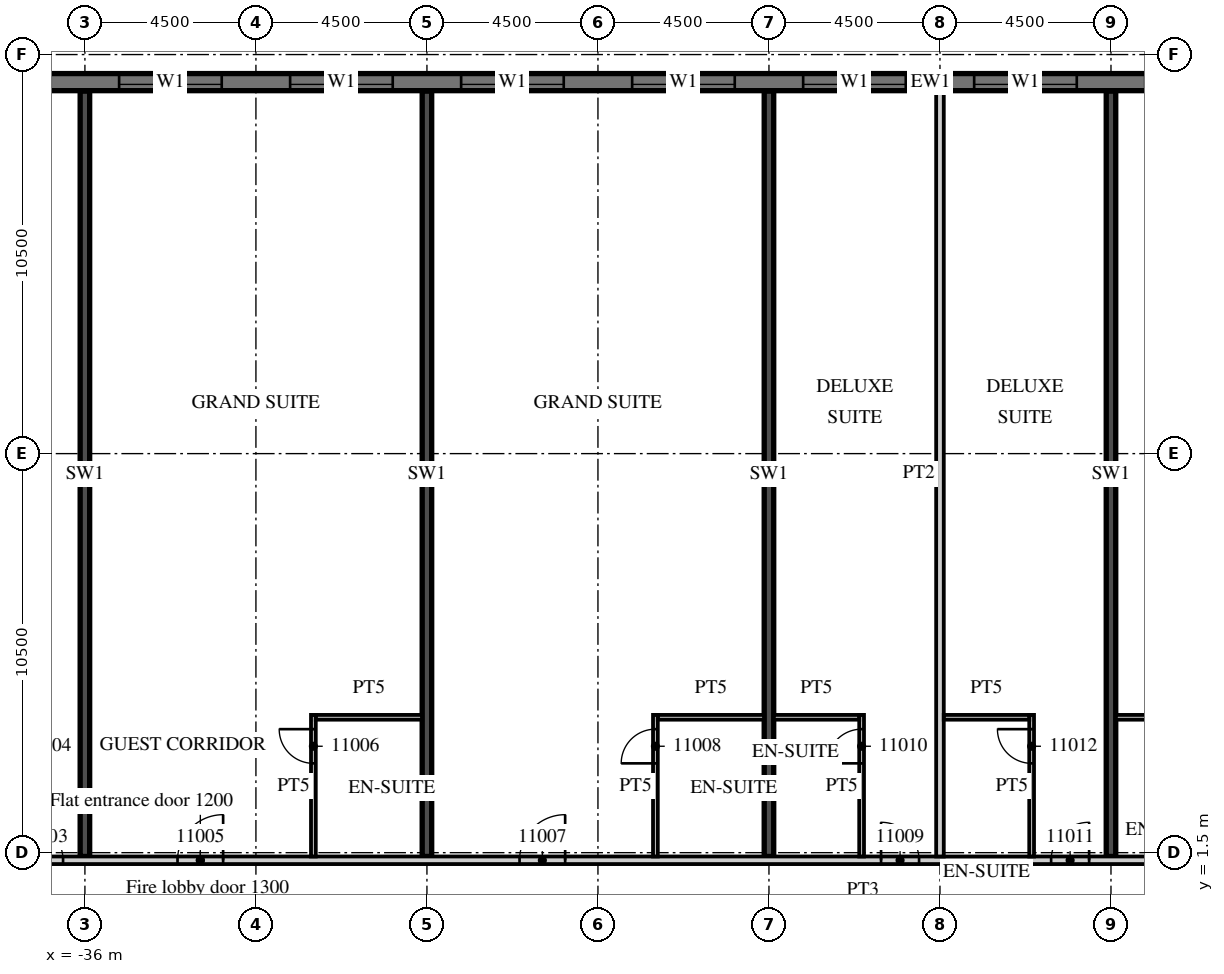
"""IFC4 building model, lengths in metres.
Left out: names, types, materials, properties, quantities, classifications, styles, units other than length and angle.
Written with IfcOpenShell. Run it as: python <this file> out.ifc"""

import sys

from ifc_helpers import new_model, si_unit, direction, frame, frame_2d, origin, place, context, subcontext, project, spatial, rectangle, extrude, element, fill, save


model = new_model("IFC4")
c1 = context("Model", 3, precision=1e-05, world=origin(), true_north=direction((0.0, 1.0)))
c2 = subcontext(c1, "Body", "Model", "MODEL_VIEW")
j1 = project(units=[si_unit("LENGTHUNIT", "METRE"), si_unit("PLANEANGLEUNIT", "RADIAN")], contexts=[c1])
p1 = place(None, origin())
s1 = spatial("IfcSite", under=j1, at=p1, CompositionType="ELEMENT")
p2 = place(p1, origin())
s2 = spatial("IfcBuilding", under=s1, at=p2, CompositionType="ELEMENT")
p3 = place(p2, frame((0.0, 0.0, 66.6)))
s3 = spatial("IfcBuildingStorey", under=s2, at=p3, CompositionType="ELEMENT", Elevation=66.6)
for number, where, z_axis, x_axis in (
    (1, (-36.0, 1.4, 0.0), (0.0, 0.0, 1.0), (0.0, 1.0, 0.0)),
    (2, (-27.0, 1.4, 0.0), (0.0, 0.0, 1.0), (0.0, 1.0, 0.0)),
    (3, (-18.0, 1.4, 0.0), (0.0, 0.0, 1.0), (0.0, 1.0, 0.0)),
    (4, (-9.0, 1.4, 0.0), (0.0, 0.0, 1.0), (0.0, 1.0, 0.0)),
):
    element("IfcWall", number, at=place(p3, frame(where, z_axis=z_axis, x_axis=x_axis)), inside=s3, PredefinedType="SHEAR", context=c2, shape_type="SweptSolid", body=[
        extrude(rectangle(XDim=20.14, YDim=0.25, at=frame_2d((10.07, 0.0))), origin(), (0.0, 0.0, 1.0), 3.3),
    ])
p4 = place(p3, frame((13.5, 21.775, 0.0), z_axis=(0.0, 0.0, 1.0), x_axis=(-1.0, 0.0, 0.0)))
e5 = element("IfcWall", 5, at=p4, inside=s3, PredefinedType="SOLIDWALL", context=c2, shape_type="SweptSolid", body=[
    extrude(rectangle(XDim=54.5, YDim=0.45, at=frame_2d((27.25, 0.0))), origin(), (0.0, 0.0, 1.0), 3.02),
])
p5 = place(p4, frame((0.9, 0.0, 0.45)))
e6 = element("IfcOpeningElement", 6, at=p5, cuts=e5, PredefinedType="OPENING", context=c2, shape_type="SweptSolid", body=[
    extrude(rectangle(XDim=2.7, YDim=2.25, at=frame_2d((1.35, 1.125))), frame((0.0, 0.235, 0.0), z_axis=(0.0, -1.0, 0.0), x_axis=(1.0, 0.0, 0.0)), (0.0, 0.0, 1.0), 0.47),
])
p6 = place(p4, frame((5.4, 0.0, 0.45)))
e7 = element("IfcOpeningElement", 7, at=p6, cuts=e5, PredefinedType="OPENING", context=c2, shape_type="SweptSolid", body=[
    extrude(rectangle(XDim=2.7, YDim=2.25, at=frame_2d((1.35, 1.125))), frame((0.0, 0.235, 0.0), z_axis=(0.0, -1.0, 0.0), x_axis=(1.0, 0.0, 0.0)), (0.0, 0.0, 1.0), 0.47),
])
p7 = place(p4, frame((9.9, 0.0, 0.45)))
e8 = element("IfcOpeningElement", 8, at=p7, cuts=e5, PredefinedType="OPENING", context=c2, shape_type="SweptSolid", body=[
    extrude(rectangle(XDim=2.7, YDim=2.25, at=frame_2d((1.35, 1.125))), frame((0.0, 0.235, 0.0), z_axis=(0.0, -1.0, 0.0), x_axis=(1.0, 0.0, 0.0)), (0.0, 0.0, 1.0), 0.47),
])
p8 = place(p4, frame((14.4, 0.0, 0.45)))
e9 = element("IfcOpeningElement", 9, at=p8, cuts=e5, PredefinedType="OPENING", context=c2, shape_type="SweptSolid", body=[
    extrude(rectangle(XDim=2.7, YDim=2.25, at=frame_2d((1.35, 1.125))), frame((0.0, 0.235, 0.0), z_axis=(0.0, -1.0, 0.0), x_axis=(1.0, 0.0, 0.0)), (0.0, 0.0, 1.0), 0.47),
])
p9 = place(p4, frame((18.9, 0.0, 0.45)))
e10 = element("IfcOpeningElement", 10, at=p9, cuts=e5, PredefinedType="OPENING", context=c2, shape_type="SweptSolid", body=[
    extrude(rectangle(XDim=2.7, YDim=2.25, at=frame_2d((1.35, 1.125))), frame((0.0, 0.235, 0.0), z_axis=(0.0, -1.0, 0.0), x_axis=(1.0, 0.0, 0.0)), (0.0, 0.0, 1.0), 0.47),
])
p10 = place(p4, frame((23.4, 0.0, 0.45)))
e11 = element("IfcOpeningElement", 11, at=p10, cuts=e5, PredefinedType="OPENING", context=c2, shape_type="SweptSolid", body=[
    extrude(rectangle(XDim=2.7, YDim=2.25, at=frame_2d((1.35, 1.125))), frame((0.0, 0.235, 0.0), z_axis=(0.0, -1.0, 0.0), x_axis=(1.0, 0.0, 0.0)), (0.0, 0.0, 1.0), 0.47),
])
p11 = place(p4, frame((27.9, 0.0, 0.45)))
e12 = element("IfcOpeningElement", 12, at=p11, cuts=e5, PredefinedType="OPENING", context=c2, shape_type="SweptSolid", body=[
    extrude(rectangle(XDim=2.7, YDim=2.25, at=frame_2d((1.35, 1.125))), frame((0.0, 0.235, 0.0), z_axis=(0.0, -1.0, 0.0), x_axis=(1.0, 0.0, 0.0)), (0.0, 0.0, 1.0), 0.47),
])
p12 = place(p4, frame((32.4, 0.0, 0.45)))
e13 = element("IfcOpeningElement", 13, at=p12, cuts=e5, PredefinedType="OPENING", context=c2, shape_type="SweptSolid", body=[
    extrude(rectangle(XDim=2.7, YDim=2.25, at=frame_2d((1.35, 1.125))), frame((0.0, 0.235, 0.0), z_axis=(0.0, -1.0, 0.0), x_axis=(1.0, 0.0, 0.0)), (0.0, 0.0, 1.0), 0.47),
])
p13 = place(p4, frame((36.9, 0.0, 0.45)))
e14 = element("IfcOpeningElement", 14, at=p13, cuts=e5, PredefinedType="OPENING", context=c2, shape_type="SweptSolid", body=[
    extrude(rectangle(XDim=2.7, YDim=2.25, at=frame_2d((1.35, 1.125))), frame((0.0, 0.235, 0.0), z_axis=(0.0, -1.0, 0.0), x_axis=(1.0, 0.0, 0.0)), (0.0, 0.0, 1.0), 0.47),
])
p14 = place(p4, frame((41.4, 0.0, 0.45)))
e15 = element("IfcOpeningElement", 15, at=p14, cuts=e5, PredefinedType="OPENING", context=c2, shape_type="SweptSolid", body=[
    extrude(rectangle(XDim=2.7, YDim=2.25, at=frame_2d((1.35, 1.125))), frame((0.0, 0.235, 0.0), z_axis=(0.0, -1.0, 0.0), x_axis=(1.0, 0.0, 0.0)), (0.0, 0.0, 1.0), 0.47),
])
p15 = place(p4, frame((45.9, 0.0, 0.45)))
e16 = element("IfcOpeningElement", 16, at=p15, cuts=e5, PredefinedType="OPENING", context=c2, shape_type="SweptSolid", body=[
    extrude(rectangle(XDim=2.7, YDim=2.25, at=frame_2d((1.35, 1.125))), frame((0.0, 0.235, 0.0), z_axis=(0.0, -1.0, 0.0), x_axis=(1.0, 0.0, 0.0)), (0.0, 0.0, 1.0), 0.47),
])
p16 = place(p4, frame((50.4, 0.0, 0.45)))
e17 = element("IfcOpeningElement", 17, at=p16, cuts=e5, PredefinedType="OPENING", context=c2, shape_type="SweptSolid", body=[
    extrude(rectangle(XDim=2.7, YDim=2.25, at=frame_2d((1.35, 1.125))), frame((0.0, 0.235, 0.0), z_axis=(0.0, -1.0, 0.0), x_axis=(1.0, 0.0, 0.0)), (0.0, 0.0, 1.0), 0.47),
])
p17 = place(p3, frame((-44.55, 1.3, 0.0), z_axis=(0.0, 0.0, 1.0), x_axis=(1.0, 0.0, 0.0)))
e18 = element("IfcWall", 18, at=p17, inside=s3, PredefinedType="PARTITIONING", context=c2, shape_type="SweptSolid", body=[
    extrude(rectangle(XDim=58.05, YDim=0.2, at=frame_2d((29.025, 0.0))), origin(), (0.0, 0.0, 1.0), 3.02),
])
p18 = place(p17, frame((0.525, 0.0, 0.0)))
e19 = element("IfcOpeningElement", 19, at=p18, cuts=e18, PredefinedType="OPENING", context=c2, shape_type="SweptSolid", body=[
    extrude(rectangle(XDim=1.0, YDim=2.1, at=frame_2d((0.5, 1.05))), frame((0.0, 0.11, 0.0), z_axis=(0.0, -1.0, 0.0), x_axis=(1.0, 0.0, 0.0)), (0.0, 0.0, 1.0), 0.22),
])
p19 = place(p17, frame((6.975, 0.0, 0.0)))
e20 = element("IfcOpeningElement", 20, at=p19, cuts=e18, PredefinedType="OPENING", context=c2, shape_type="SweptSolid", body=[
    extrude(rectangle(XDim=1.0, YDim=2.1, at=frame_2d((0.5, 1.05))), frame((0.0, 0.11, 0.0), z_axis=(0.0, -1.0, 0.0), x_axis=(1.0, 0.0, 0.0)), (0.0, 0.0, 1.0), 0.22),
])
p20 = place(p17, frame((10.987, 0.0, 0.0)))
e21 = element("IfcOpeningElement", 21, at=p20, cuts=e18, PredefinedType="OPENING", context=c2, shape_type="SweptSolid", body=[
    extrude(rectangle(XDim=1.2, YDim=2.1, at=frame_2d((0.6, 1.05))), frame((0.0, 0.11, 0.0), z_axis=(0.0, -1.0, 0.0), x_axis=(1.0, 0.0, 0.0)), (0.0, 0.0, 1.0), 0.22),
])
p21 = place(p17, frame((19.987, 0.0, 0.0)))
e22 = element("IfcOpeningElement", 22, at=p21, cuts=e18, PredefinedType="OPENING", context=c2, shape_type="SweptSolid", body=[
    extrude(rectangle(XDim=1.2, YDim=2.1, at=frame_2d((0.6, 1.05))), frame((0.0, 0.11, 0.0), z_axis=(0.0, -1.0, 0.0), x_axis=(1.0, 0.0, 0.0)), (0.0, 0.0, 1.0), 0.22),
])
p22 = place(p17, frame((29.5, 0.0, 0.0)))
e23 = element("IfcOpeningElement", 23, at=p22, cuts=e18, PredefinedType="OPENING", context=c2, shape_type="SweptSolid", body=[
    extrude(rectangle(XDim=1.0, YDim=2.1, at=frame_2d((0.5, 1.05))), frame((0.0, 0.11, 0.0), z_axis=(0.0, -1.0, 0.0), x_axis=(1.0, 0.0, 0.0)), (0.0, 0.0, 1.0), 0.22),
])
p23 = place(p17, frame((33.975, 0.0, 0.0)))
e24 = element("IfcOpeningElement", 24, at=p23, cuts=e18, PredefinedType="OPENING", context=c2, shape_type="SweptSolid", body=[
    extrude(rectangle(XDim=1.0, YDim=2.1, at=frame_2d((0.5, 1.05))), frame((0.0, 0.11, 0.0), z_axis=(0.0, -1.0, 0.0), x_axis=(1.0, 0.0, 0.0)), (0.0, 0.0, 1.0), 0.22),
])
p24 = place(p17, frame((40.912, 0.0, 0.0)))
e25 = element("IfcOpeningElement", 25, at=p24, cuts=e18, PredefinedType="OPENING", context=c2, shape_type="SweptSolid", body=[
    extrude(rectangle(XDim=1.2, YDim=2.1, at=frame_2d((0.6, 1.05))), frame((0.0, 0.11, 0.0), z_axis=(0.0, -1.0, 0.0), x_axis=(1.0, 0.0, 0.0)), (0.0, 0.0, 1.0), 0.22),
])
p25 = place(p17, frame((47.5, 0.0, 0.0)))
e26 = element("IfcOpeningElement", 26, at=p25, cuts=e18, PredefinedType="OPENING", context=c2, shape_type="SweptSolid", body=[
    extrude(rectangle(XDim=1.0, YDim=2.1, at=frame_2d((0.5, 1.05))), frame((0.0, 0.11, 0.0), z_axis=(0.0, -1.0, 0.0), x_axis=(1.0, 0.0, 0.0)), (0.0, 0.0, 1.0), 0.22),
])
p26 = place(p17, frame((51.975, 0.0, 0.0)))
e27 = element("IfcOpeningElement", 27, at=p26, cuts=e18, PredefinedType="OPENING", context=c2, shape_type="SweptSolid", body=[
    extrude(rectangle(XDim=1.0, YDim=2.1, at=frame_2d((0.5, 1.05))), frame((0.0, 0.11, 0.0), z_axis=(0.0, -1.0, 0.0), x_axis=(1.0, 0.0, 0.0)), (0.0, 0.0, 1.0), 0.22),
])
p27 = place(p17, frame((56.475, 0.0, 0.0)))
e28 = element("IfcOpeningElement", 28, at=p27, cuts=e18, PredefinedType="OPENING", context=c2, shape_type="SweptSolid", body=[
    extrude(rectangle(XDim=1.0, YDim=2.1, at=frame_2d((0.5, 1.05))), frame((0.0, 0.11, 0.0), z_axis=(0.0, -1.0, 0.0), x_axis=(1.0, 0.0, 0.0)), (0.0, 0.0, 1.0), 0.22),
])
p28 = place(p3, frame((-29.988, 1.4, 0.0), z_axis=(0.0, 0.0, 1.0), x_axis=(0.0, 1.0, 0.0)))
e29 = element("IfcWall", 29, at=p28, inside=s3, PredefinedType="PARTITIONING", context=c2, shape_type="SweptSolid", body=[
    extrude(rectangle(XDim=3.725, YDim=0.125, at=frame_2d((1.863, 0.0))), origin(), (0.0, 0.0, 1.0), 3.02),
])
p29 = place(p28, frame((2.45, 0.0, 0.0)))
e30 = element("IfcOpeningElement", 30, at=p29, cuts=e29, PredefinedType="OPENING", context=c2, shape_type="SweptSolid", body=[
    extrude(rectangle(XDim=0.9, YDim=2.1, at=frame_2d((0.45, 1.05))), frame((0.0, 0.073, 0.0), z_axis=(0.0, -1.0, 0.0), x_axis=(1.0, 0.0, 0.0)), (0.0, 0.0, 1.0), 0.145),
])
p30 = place(p3, frame((-29.925, 5.062, 0.0), z_axis=(0.0, 0.0, 1.0), x_axis=(1.0, 0.0, 0.0)))
e31 = element("IfcWall", 31, at=p30, inside=s3, PredefinedType="PARTITIONING", context=c2, shape_type="SweptSolid", body=[
    extrude(rectangle(XDim=2.8, YDim=0.125, at=frame_2d((1.4, 0.0))), origin(), (0.0, 0.0, 1.0), 3.02),
])
p31 = place(p3, frame((-20.988, 1.4, 0.0), z_axis=(0.0, 0.0, 1.0), x_axis=(0.0, 1.0, 0.0)))
e32 = element("IfcWall", 32, at=p31, inside=s3, PredefinedType="PARTITIONING", context=c2, shape_type="SweptSolid", body=[
    extrude(rectangle(XDim=3.725, YDim=0.125, at=frame_2d((1.863, 0.0))), origin(), (0.0, 0.0, 1.0), 3.02),
])
p32 = place(p31, frame((2.45, 0.0, 0.0)))
e33 = element("IfcOpeningElement", 33, at=p32, cuts=e32, PredefinedType="OPENING", context=c2, shape_type="SweptSolid", body=[
    extrude(rectangle(XDim=0.9, YDim=2.1, at=frame_2d((0.45, 1.05))), frame((0.0, 0.073, 0.0), z_axis=(0.0, -1.0, 0.0), x_axis=(1.0, 0.0, 0.0)), (0.0, 0.0, 1.0), 0.145),
])
p33 = place(p3, frame((-20.925, 5.062, 0.0), z_axis=(0.0, 0.0, 1.0), x_axis=(1.0, 0.0, 0.0)))
e34 = element("IfcWall", 34, at=p33, inside=s3, PredefinedType="PARTITIONING", context=c2, shape_type="SweptSolid", body=[
    extrude(rectangle(XDim=2.8, YDim=0.125, at=frame_2d((1.4, 0.0))), origin(), (0.0, 0.0, 1.0), 3.02),
])
p34 = place(p3, frame((-13.5, 1.4, 0.0), z_axis=(0.0, 0.0, 1.0), x_axis=(0.0, 1.0, 0.0)))
e35 = element("IfcWall", 35, at=p34, inside=s3, PredefinedType="PARTITIONING", context=c2, shape_type="SweptSolid", body=[
    extrude(rectangle(XDim=20.15, YDim=0.2, at=frame_2d((10.075, 0.0))), origin(), (0.0, 0.0, 1.0), 3.02),
])
p35 = place(p3, frame((-15.562, 1.4, 0.0), z_axis=(0.0, 0.0, 1.0), x_axis=(0.0, 1.0, 0.0)))
e36 = element("IfcWall", 36, at=p35, inside=s3, PredefinedType="PARTITIONING", context=c2, shape_type="SweptSolid", body=[
    extrude(rectangle(XDim=3.725, YDim=0.125, at=frame_2d((1.863, 0.0))), origin(), (0.0, 0.0, 1.0), 3.02),
])
p36 = place(p35, frame((2.45, 0.0, 0.0)))
e37 = element("IfcOpeningElement", 37, at=p36, cuts=e36, PredefinedType="OPENING", context=c2, shape_type="SweptSolid", body=[
    extrude(rectangle(XDim=0.9, YDim=2.1, at=frame_2d((0.45, 1.05))), frame((0.0, 0.073, 0.0), z_axis=(0.0, -1.0, 0.0), x_axis=(1.0, 0.0, 0.0)), (0.0, 0.0, 1.0), 0.145),
])
p37 = place(p3, frame((-17.875, 5.062, 0.0), z_axis=(0.0, 0.0, 1.0), x_axis=(1.0, 0.0, 0.0)))
e38 = element("IfcWall", 38, at=p37, inside=s3, PredefinedType="PARTITIONING", context=c2, shape_type="SweptSolid", body=[
    extrude(rectangle(XDim=2.25, YDim=0.125, at=frame_2d((1.125, 0.0))), origin(), (0.0, 0.0, 1.0), 3.02),
])
p38 = place(p3, frame((-11.088, 1.4, 0.0), z_axis=(0.0, 0.0, 1.0), x_axis=(0.0, 1.0, 0.0)))
e39 = element("IfcWall", 39, at=p38, inside=s3, PredefinedType="PARTITIONING", context=c2, shape_type="SweptSolid", body=[
    extrude(rectangle(XDim=3.725, YDim=0.125, at=frame_2d((1.863, 0.0))), origin(), (0.0, 0.0, 1.0), 3.02),
])
p39 = place(p38, frame((2.45, 0.0, 0.0)))
e40 = element("IfcOpeningElement", 40, at=p39, cuts=e39, PredefinedType="OPENING", context=c2, shape_type="SweptSolid", body=[
    extrude(rectangle(XDim=0.9, YDim=2.1, at=frame_2d((0.45, 1.05))), frame((0.0, 0.073, 0.0), z_axis=(0.0, -1.0, 0.0), x_axis=(1.0, 0.0, 0.0)), (0.0, 0.0, 1.0), 0.145),
])
p40 = place(p3, frame((-13.4, 5.062, 0.0), z_axis=(0.0, 0.0, 1.0), x_axis=(1.0, 0.0, 0.0)))
e41 = element("IfcWall", 41, at=p40, inside=s3, PredefinedType="PARTITIONING", context=c2, shape_type="SweptSolid", body=[
    extrude(rectangle(XDim=2.25, YDim=0.125, at=frame_2d((1.125, 0.0))), origin(), (0.0, 0.0, 1.0), 3.02),
])
p41 = place(p3, frame((-8.875, 5.062, 0.0), z_axis=(0.0, 0.0, 1.0), x_axis=(1.0, 0.0, 0.0)))
e42 = element("IfcWall", 42, at=p41, inside=s3, PredefinedType="PARTITIONING", context=c2, shape_type="SweptSolid", body=[
    extrude(rectangle(XDim=2.8, YDim=0.125, at=frame_2d((1.4, 0.0))), origin(), (0.0, 0.0, 1.0), 3.02),
])
p42 = place(p10, origin())
e43 = element("IfcWindow", 43, at=p42, inside=s3, PartitioningType="SINGLE_PANEL", PredefinedType="WINDOW", context=c2, shape_type="SweptSolid", body=[
    extrude(rectangle(XDim=2.7, YDim=2.25, at=frame_2d((1.35, 1.125))), frame((0.0, 0.09, 0.0), z_axis=(0.0, -1.0, 0.0), x_axis=(1.0, 0.0, 0.0)), (0.0, 0.0, 1.0), 0.06),
])
fill(e11, e43)
p43 = place(p11, origin())
e44 = element("IfcWindow", 44, at=p43, inside=s3, PartitioningType="SINGLE_PANEL", PredefinedType="WINDOW", context=c2, shape_type="SweptSolid", body=[
    extrude(rectangle(XDim=2.7, YDim=2.25, at=frame_2d((1.35, 1.125))), frame((0.0, 0.09, 0.0), z_axis=(0.0, -1.0, 0.0), x_axis=(1.0, 0.0, 0.0)), (0.0, 0.0, 1.0), 0.06),
])
fill(e12, e44)
p44 = place(p12, origin())
e45 = element("IfcWindow", 45, at=p44, inside=s3, PartitioningType="SINGLE_PANEL", PredefinedType="WINDOW", context=c2, shape_type="SweptSolid", body=[
    extrude(rectangle(XDim=2.7, YDim=2.25, at=frame_2d((1.35, 1.125))), frame((0.0, 0.09, 0.0), z_axis=(0.0, -1.0, 0.0), x_axis=(1.0, 0.0, 0.0)), (0.0, 0.0, 1.0), 0.06),
])
fill(e13, e45)
p45 = place(p13, origin())
e46 = element("IfcWindow", 46, at=p45, inside=s3, PartitioningType="SINGLE_PANEL", PredefinedType="WINDOW", context=c2, shape_type="SweptSolid", body=[
    extrude(rectangle(XDim=2.7, YDim=2.25, at=frame_2d((1.35, 1.125))), frame((0.0, 0.09, 0.0), z_axis=(0.0, -1.0, 0.0), x_axis=(1.0, 0.0, 0.0)), (0.0, 0.0, 1.0), 0.06),
])
fill(e14, e46)
p46 = place(p14, origin())
e47 = element("IfcWindow", 47, at=p46, inside=s3, PartitioningType="SINGLE_PANEL", PredefinedType="WINDOW", context=c2, shape_type="SweptSolid", body=[
    extrude(rectangle(XDim=2.7, YDim=2.25, at=frame_2d((1.35, 1.125))), frame((0.0, 0.09, 0.0), z_axis=(0.0, -1.0, 0.0), x_axis=(1.0, 0.0, 0.0)), (0.0, 0.0, 1.0), 0.06),
])
fill(e15, e47)
p47 = place(p15, origin())
e48 = element("IfcWindow", 48, at=p47, inside=s3, PartitioningType="SINGLE_PANEL", PredefinedType="WINDOW", context=c2, shape_type="SweptSolid", body=[
    extrude(rectangle(XDim=2.7, YDim=2.25, at=frame_2d((1.35, 1.125))), frame((0.0, 0.09, 0.0), z_axis=(0.0, -1.0, 0.0), x_axis=(1.0, 0.0, 0.0)), (0.0, 0.0, 1.0), 0.06),
])
fill(e16, e48)
p48 = place(p19, origin())
e49 = element("IfcDoor", 49, at=p48, inside=s3, OperationType="SINGLE_SWING_LEFT", PredefinedType="DOOR", context=c2, shape_type="SweptSolid", body=[
    extrude(rectangle(XDim=1.0, YDim=2.1, at=frame_2d((0.5, 1.05))), frame((0.0, 0.025, 0.0), z_axis=(0.0, -1.0, 0.0), x_axis=(1.0, 0.0, 0.0)), (0.0, 0.0, 1.0), 0.05),
])
fill(e20, e49)
p49 = place(p20, origin())
e50 = element("IfcDoor", 50, at=p49, inside=s3, OperationType="SINGLE_SWING_RIGHT", PredefinedType="DOOR", context=c2, shape_type="SweptSolid", body=[
    extrude(rectangle(XDim=1.2, YDim=2.1, at=frame_2d((0.6, 1.05))), frame((0.0, 0.025, 0.0), z_axis=(0.0, -1.0, 0.0), x_axis=(1.0, 0.0, 0.0)), (0.0, 0.0, 1.0), 0.05),
])
fill(e21, e50)
p50 = place(p29, origin())
e51 = element("IfcDoor", 51, at=p50, inside=s3, OperationType="SINGLE_SWING_RIGHT", PredefinedType="DOOR", context=c2, shape_type="SweptSolid", body=[
    extrude(rectangle(XDim=0.9, YDim=2.1, at=frame_2d((0.45, 1.05))), frame((0.0, 0.025, 0.0), z_axis=(0.0, -1.0, 0.0), x_axis=(1.0, 0.0, 0.0)), (0.0, 0.0, 1.0), 0.05),
])
fill(e30, e51)
p51 = place(p21, origin())
e52 = element("IfcDoor", 52, at=p51, inside=s3, OperationType="SINGLE_SWING_RIGHT", PredefinedType="DOOR", context=c2, shape_type="SweptSolid", body=[
    extrude(rectangle(XDim=1.2, YDim=2.1, at=frame_2d((0.6, 1.05))), frame((0.0, 0.025, 0.0), z_axis=(0.0, -1.0, 0.0), x_axis=(1.0, 0.0, 0.0)), (0.0, 0.0, 1.0), 0.05),
])
fill(e22, e52)
p52 = place(p32, origin())
e53 = element("IfcDoor", 53, at=p52, inside=s3, OperationType="SINGLE_SWING_LEFT", PredefinedType="DOOR", context=c2, shape_type="SweptSolid", body=[
    extrude(rectangle(XDim=0.9, YDim=2.1, at=frame_2d((0.45, 1.05))), frame((0.0, 0.025, 0.0), z_axis=(0.0, -1.0, 0.0), x_axis=(1.0, 0.0, 0.0)), (0.0, 0.0, 1.0), 0.05),
])
fill(e33, e53)
p53 = place(p22, origin())
e54 = element("IfcDoor", 54, at=p53, inside=s3, OperationType="SINGLE_SWING_LEFT", PredefinedType="DOOR", context=c2, shape_type="SweptSolid", body=[
    extrude(rectangle(XDim=1.0, YDim=2.1, at=frame_2d((0.5, 1.05))), frame((0.0, 0.025, 0.0), z_axis=(0.0, -1.0, 0.0), x_axis=(1.0, 0.0, 0.0)), (0.0, 0.0, 1.0), 0.05),
])
fill(e23, e54)
p54 = place(p36, origin())
e55 = element("IfcDoor", 55, at=p54, inside=s3, OperationType="SINGLE_SWING_LEFT", PredefinedType="DOOR", context=c2, shape_type="SweptSolid", body=[
    extrude(rectangle(XDim=0.9, YDim=2.1, at=frame_2d((0.45, 1.05))), frame((0.0, 0.025, 0.0), z_axis=(0.0, -1.0, 0.0), x_axis=(1.0, 0.0, 0.0)), (0.0, 0.0, 1.0), 0.05),
])
fill(e37, e55)
p55 = place(p23, origin())
e56 = element("IfcDoor", 56, at=p55, inside=s3, OperationType="SINGLE_SWING_RIGHT", PredefinedType="DOOR", context=c2, shape_type="SweptSolid", body=[
    extrude(rectangle(XDim=1.0, YDim=2.1, at=frame_2d((0.5, 1.05))), frame((0.0, 0.025, 0.0), z_axis=(0.0, -1.0, 0.0), x_axis=(1.0, 0.0, 0.0)), (0.0, 0.0, 1.0), 0.05),
])
fill(e24, e56)
p56 = place(p39, origin())
e57 = element("IfcDoor", 57, at=p56, inside=s3, OperationType="SINGLE_SWING_RIGHT", PredefinedType="DOOR", context=c2, shape_type="SweptSolid", body=[
    extrude(rectangle(XDim=0.9, YDim=2.1, at=frame_2d((0.45, 1.05))), frame((0.0, 0.025, 0.0), z_axis=(0.0, -1.0, 0.0), x_axis=(1.0, 0.0, 0.0)), (0.0, 0.0, 1.0), 0.05),
])
fill(e40, e57)
save(model, sys.argv[1])
